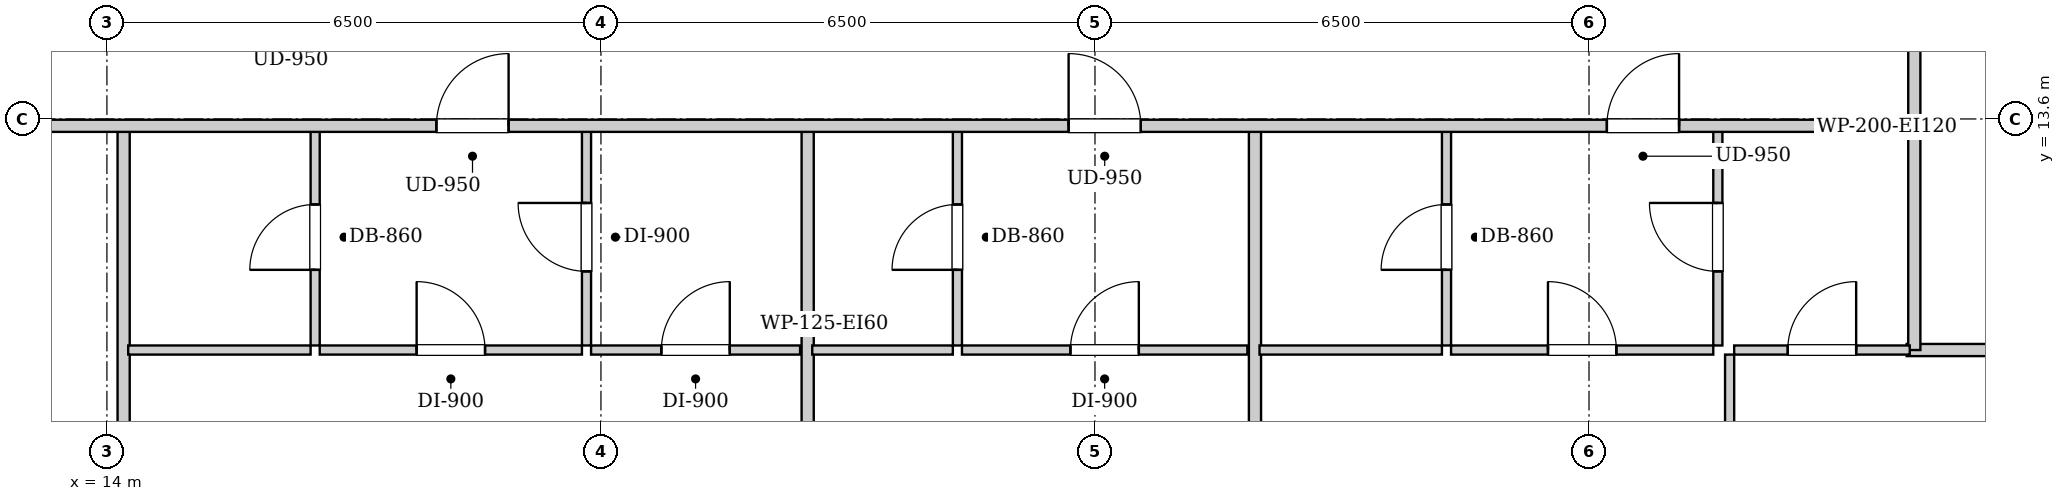
"""IFC4 building model, lengths in metres.
Left out: names, types, materials, properties, quantities, classifications, styles, units other than length and angle.
Written with IfcOpenShell. Run it as: python <this file> out.ifc"""

import sys

from ifc_helpers import new_model, si_unit, direction, frame, frame_2d, origin, place, context, subcontext, project, spatial, rectangle, extrude, element, fill, save


model = new_model("IFC4")
c1 = context("Model", 3, precision=1e-05, world=origin(), true_north=direction((0.0, 1.0)))
c2 = subcontext(c1, "Body", "Model", "MODEL_VIEW")
j1 = project(units=[si_unit("LENGTHUNIT", "METRE"), si_unit("PLANEANGLEUNIT", "RADIAN")], contexts=[c1])
p1 = place(None, origin())
s1 = spatial("IfcSite", under=j1, at=p1, CompositionType="ELEMENT")
p2 = place(p1, origin())
s2 = spatial("IfcBuilding", under=s1, at=p2, CompositionType="ELEMENT")
p3 = place(p2, frame((0.0, 0.0, 251.3)))
s3 = spatial("IfcBuildingStorey", under=s2, at=p3, CompositionType="ELEMENT", Elevation=251.3)
p4 = place(p3, frame((37.78, 13.51, 0.0), z_axis=(0.0, 0.0, 1.0), x_axis=(0.0, 1.0, 0.0)))
e1 = element("IfcWall", 1, at=p4, inside=s3, PredefinedType="PARTITIONING", context=c2, shape_type="SweptSolid", body=[
    extrude(rectangle(XDim=1.58, YDim=0.16, at=frame_2d((0.79, 0.0))), origin(), (0.0, 0.0, 1.0), 3.14),
])
p5 = place(p3, frame((14.22, 4.08, 0.0), z_axis=(0.0, 0.0, 1.0), x_axis=(0.0, 1.0, 0.0)))
e2 = element("IfcWall", 2, at=p5, inside=s3, PredefinedType="PARTITIONING", context=c2, shape_type="SweptSolid", body=[
    extrude(rectangle(XDim=9.39, YDim=0.16, at=frame_2d((4.695, 0.0))), origin(), (0.0, 0.0, 1.0), 3.14),
])
p6 = place(p3, frame((16.74, 10.62, 0.0), z_axis=(0.0, 0.0, 1.0), x_axis=(0.0, 1.0, 0.0)))
e3 = element("IfcWall", 3, at=p6, inside=s3, PredefinedType="PARTITIONING", context=c2, shape_type="SweptSolid", body=[
    extrude(rectangle(XDim=2.85, YDim=0.12, at=frame_2d((1.425, 0.0))), origin(), (0.0, 0.0, 1.0), 3.14),
])
p7 = place(p6, frame((0.995, 0.0, 0.0)))
e4 = element("IfcOpeningElement", 4, at=p7, cuts=e3, PredefinedType="OPENING", context=c2, shape_type="SweptSolid", body=[
    extrude(rectangle(XDim=0.86, YDim=2.05, at=frame_2d((0.43, 1.025))), frame((0.0, 0.07, 0.0), z_axis=(0.0, -1.0, 0.0), x_axis=(1.0, 0.0, 0.0)), (0.0, 0.0, 1.0), 0.14),
])
p8 = place(p3, frame((14.28, 10.56, 0.0), z_axis=(0.0, 0.0, 1.0), x_axis=(1.0, 0.0, 0.0)))
e5 = element("IfcWall", 5, at=p8, inside=s3, PredefinedType="PARTITIONING", context=c2, shape_type="SweptSolid", body=[
    extrude(rectangle(XDim=2.4, YDim=0.12, at=frame_2d((1.2, 0.0))), origin(), (0.0, 0.0, 1.0), 3.14),
])
p9 = place(p3, frame((20.31, 10.62, 0.0), z_axis=(0.0, 0.0, 1.0), x_axis=(0.0, 1.0, 0.0)))
e6 = element("IfcWall", 6, at=p9, inside=s3, PredefinedType="PARTITIONING", context=c2, shape_type="SweptSolid", body=[
    extrude(rectangle(XDim=2.85, YDim=0.12, at=frame_2d((1.425, 0.0))), origin(), (0.0, 0.0, 1.0), 3.14),
])
p10 = place(p9, frame((0.975, 0.0, 0.0)))
e7 = element("IfcOpeningElement", 7, at=p10, cuts=e6, PredefinedType="OPENING", context=c2, shape_type="SweptSolid", body=[
    extrude(rectangle(XDim=0.9, YDim=2.05, at=frame_2d((0.45, 1.025))), frame((0.0, 0.07, 0.0), z_axis=(0.0, -1.0, 0.0), x_axis=(1.0, 0.0, 0.0)), (0.0, 0.0, 1.0), 0.14),
])
p11 = place(p3, frame((16.8, 10.56, 0.0), z_axis=(0.0, 0.0, 1.0), x_axis=(1.0, 0.0, 0.0)))
e8 = element("IfcWall", 8, at=p11, inside=s3, PredefinedType="PARTITIONING", context=c2, shape_type="SweptSolid", body=[
    extrude(rectangle(XDim=3.45, YDim=0.12, at=frame_2d((1.725, 0.0))), origin(), (0.0, 0.0, 1.0), 3.14),
])
p12 = place(p11, frame((1.275, 0.0, 0.0)))
e9 = element("IfcOpeningElement", 9, at=p12, cuts=e8, PredefinedType="OPENING", context=c2, shape_type="SweptSolid", body=[
    extrude(rectangle(XDim=0.9, YDim=2.05, at=frame_2d((0.45, 1.025))), frame((0.0, 0.07, 0.0), z_axis=(0.0, -1.0, 0.0), x_axis=(1.0, 0.0, 0.0)), (0.0, 0.0, 1.0), 0.14),
])
p13 = place(p3, frame((20.37, 10.56, 0.0), z_axis=(0.0, 0.0, 1.0), x_axis=(1.0, 0.0, 0.0)))
e10 = element("IfcWall", 10, at=p13, inside=s3, PredefinedType="PARTITIONING", context=c2, shape_type="SweptSolid", body=[
    extrude(rectangle(XDim=2.75, YDim=0.12, at=frame_2d((1.375, 0.0))), origin(), (0.0, 0.0, 1.0), 3.14),
])
p14 = place(p13, frame((0.925, 0.0, 0.0)))
e11 = element("IfcOpeningElement", 11, at=p14, cuts=e10, PredefinedType="OPENING", context=c2, shape_type="SweptSolid", body=[
    extrude(rectangle(XDim=0.9, YDim=2.05, at=frame_2d((0.45, 1.025))), frame((0.0, 0.07, 0.0), z_axis=(0.0, -1.0, 0.0), x_axis=(1.0, 0.0, 0.0)), (0.0, 0.0, 1.0), 0.14),
])
p15 = place(p3, frame((23.22, 4.08, 0.0), z_axis=(0.0, 0.0, 1.0), x_axis=(0.0, 1.0, 0.0)))
e12 = element("IfcWall", 12, at=p15, inside=s3, PredefinedType="PARTITIONING", context=c2, shape_type="SweptSolid", body=[
    extrude(rectangle(XDim=9.39, YDim=0.16, at=frame_2d((4.695, 0.0))), origin(), (0.0, 0.0, 1.0), 3.14),
])
p16 = place(p3, frame((25.19, 10.62, 0.0), z_axis=(0.0, 0.0, 1.0), x_axis=(0.0, 1.0, 0.0)))
e13 = element("IfcWall", 13, at=p16, inside=s3, PredefinedType="PARTITIONING", context=c2, shape_type="SweptSolid", body=[
    extrude(rectangle(XDim=2.85, YDim=0.12, at=frame_2d((1.425, 0.0))), origin(), (0.0, 0.0, 1.0), 3.14),
])
p17 = place(p16, frame((0.995, 0.0, 0.0)))
e14 = element("IfcOpeningElement", 14, at=p17, cuts=e13, PredefinedType="OPENING", context=c2, shape_type="SweptSolid", body=[
    extrude(rectangle(XDim=0.86, YDim=2.05, at=frame_2d((0.43, 1.025))), frame((0.0, 0.07, 0.0), z_axis=(0.0, -1.0, 0.0), x_axis=(1.0, 0.0, 0.0)), (0.0, 0.0, 1.0), 0.14),
])
p18 = place(p3, frame((23.28, 10.56, 0.0), z_axis=(0.0, 0.0, 1.0), x_axis=(1.0, 0.0, 0.0)))
e15 = element("IfcWall", 15, at=p18, inside=s3, PredefinedType="PARTITIONING", context=c2, shape_type="SweptSolid", body=[
    extrude(rectangle(XDim=1.85, YDim=0.12, at=frame_2d((0.925, 0.0))), origin(), (0.0, 0.0, 1.0), 3.14),
])
p19 = place(p3, frame((25.25, 10.56, 0.0), z_axis=(0.0, 0.0, 1.0), x_axis=(1.0, 0.0, 0.0)))
e16 = element("IfcWall", 16, at=p19, inside=s3, PredefinedType="PARTITIONING", context=c2, shape_type="SweptSolid", body=[
    extrude(rectangle(XDim=3.755, YDim=0.12, at=frame_2d((1.877, 0.0))), origin(), (0.0, 0.0, 1.0), 3.14),
])
p20 = place(p19, frame((1.427, 0.0, 0.0)))
e17 = element("IfcOpeningElement", 17, at=p20, cuts=e16, PredefinedType="OPENING", context=c2, shape_type="SweptSolid", body=[
    extrude(rectangle(XDim=0.9, YDim=2.05, at=frame_2d((0.45, 1.025))), frame((0.0, 0.07, 0.0), z_axis=(0.0, -1.0, 0.0), x_axis=(1.0, 0.0, 0.0)), (0.0, 0.0, 1.0), 0.14),
])
p21 = place(p3, frame((37.68, 10.56, 0.0), z_axis=(0.0, 0.0, 1.0), x_axis=(1.0, 0.0, 0.0)))
e18 = element("IfcWall", 18, at=p21, inside=s3, PredefinedType="PARTITIONING", context=c2, shape_type="SweptSolid", body=[
    extrude(rectangle(XDim=2.34, YDim=0.16, at=frame_2d((1.17, 0.0))), origin(), (0.0, 0.0, 1.0), 3.14),
])
p22 = place(p3, frame((37.78, 10.56, 0.0), z_axis=(0.0, 0.0, 1.0), x_axis=(0.0, 1.0, 0.0)))
e19 = element("IfcWall", 19, at=p22, inside=s3, PredefinedType="PARTITIONING", context=c2, shape_type="SweptSolid", body=[
    extrude(rectangle(XDim=2.91, YDim=0.16, at=frame_2d((1.455, 0.0))), origin(), (0.0, 0.0, 1.0), 3.14),
])
p23 = place(p3, frame((29.105, 4.08, 0.0), z_axis=(0.0, 0.0, 1.0), x_axis=(0.0, 1.0, 0.0)))
e20 = element("IfcWall", 20, at=p23, inside=s3, PredefinedType="PARTITIONING", context=c2, shape_type="SweptSolid", body=[
    extrude(rectangle(XDim=9.39, YDim=0.16, at=frame_2d((4.695, 0.0))), origin(), (0.0, 0.0, 1.0), 3.14),
])
p24 = place(p3, frame((31.625, 10.62, 0.0), z_axis=(0.0, 0.0, 1.0), x_axis=(0.0, 1.0, 0.0)))
e21 = element("IfcWall", 21, at=p24, inside=s3, PredefinedType="PARTITIONING", context=c2, shape_type="SweptSolid", body=[
    extrude(rectangle(XDim=2.85, YDim=0.12, at=frame_2d((1.425, 0.0))), origin(), (0.0, 0.0, 1.0), 3.14),
])
p25 = place(p24, frame((0.995, 0.0, 0.0)))
e22 = element("IfcOpeningElement", 22, at=p25, cuts=e21, PredefinedType="OPENING", context=c2, shape_type="SweptSolid", body=[
    extrude(rectangle(XDim=0.86, YDim=2.05, at=frame_2d((0.43, 1.025))), frame((0.0, 0.07, 0.0), z_axis=(0.0, -1.0, 0.0), x_axis=(1.0, 0.0, 0.0)), (0.0, 0.0, 1.0), 0.14),
])
p26 = place(p3, frame((29.165, 10.56, 0.0), z_axis=(0.0, 0.0, 1.0), x_axis=(1.0, 0.0, 0.0)))
e23 = element("IfcWall", 23, at=p26, inside=s3, PredefinedType="PARTITIONING", context=c2, shape_type="SweptSolid", body=[
    extrude(rectangle(XDim=2.4, YDim=0.12, at=frame_2d((1.2, 0.0))), origin(), (0.0, 0.0, 1.0), 3.14),
])
p27 = place(p3, frame((35.195, 10.62, 0.0), z_axis=(0.0, 0.0, 1.0), x_axis=(0.0, 1.0, 0.0)))
e24 = element("IfcWall", 24, at=p27, inside=s3, PredefinedType="PARTITIONING", context=c2, shape_type="SweptSolid", body=[
    extrude(rectangle(XDim=2.85, YDim=0.12, at=frame_2d((1.425, 0.0))), origin(), (0.0, 0.0, 1.0), 3.14),
])
p28 = place(p27, frame((0.975, 0.0, 0.0)))
e25 = element("IfcOpeningElement", 25, at=p28, cuts=e24, PredefinedType="OPENING", context=c2, shape_type="SweptSolid", body=[
    extrude(rectangle(XDim=0.9, YDim=2.05, at=frame_2d((0.45, 1.025))), frame((0.0, 0.07, 0.0), z_axis=(0.0, -1.0, 0.0), x_axis=(1.0, 0.0, 0.0)), (0.0, 0.0, 1.0), 0.14),
])
p29 = place(p3, frame((31.685, 10.56, 0.0), z_axis=(0.0, 0.0, 1.0), x_axis=(1.0, 0.0, 0.0)))
e26 = element("IfcWall", 26, at=p29, inside=s3, PredefinedType="PARTITIONING", context=c2, shape_type="SweptSolid", body=[
    extrude(rectangle(XDim=3.45, YDim=0.12, at=frame_2d((1.725, 0.0))), origin(), (0.0, 0.0, 1.0), 3.14),
])
p30 = place(p29, frame((1.275, 0.0, 0.0)))
e27 = element("IfcOpeningElement", 27, at=p30, cuts=e26, PredefinedType="OPENING", context=c2, shape_type="SweptSolid", body=[
    extrude(rectangle(XDim=0.9, YDim=2.05, at=frame_2d((0.45, 1.025))), frame((0.0, 0.07, 0.0), z_axis=(0.0, -1.0, 0.0), x_axis=(1.0, 0.0, 0.0)), (0.0, 0.0, 1.0), 0.14),
])
p31 = place(p3, frame((35.41, 10.56, 0.0), z_axis=(0.0, 0.0, 1.0), x_axis=(1.0, 0.0, 0.0)))
e28 = element("IfcWall", 28, at=p31, inside=s3, PredefinedType="PARTITIONING", context=c2, shape_type="SweptSolid", body=[
    extrude(rectangle(XDim=2.31, YDim=0.12, at=frame_2d((1.155, 0.0))), origin(), (0.0, 0.0, 1.0), 3.14),
])
p32 = place(p31, frame((0.705, 0.0, 0.0)))
e29 = element("IfcOpeningElement", 29, at=p32, cuts=e28, PredefinedType="OPENING", context=c2, shape_type="SweptSolid", body=[
    extrude(rectangle(XDim=0.9, YDim=2.05, at=frame_2d((0.45, 1.025))), frame((0.0, 0.07, 0.0), z_axis=(0.0, -1.0, 0.0), x_axis=(1.0, 0.0, 0.0)), (0.0, 0.0, 1.0), 0.14),
])
p33 = place(p3, frame((35.35, 4.08, 0.0), z_axis=(0.0, 0.0, 1.0), x_axis=(0.0, 1.0, 0.0)))
e30 = element("IfcWall", 30, at=p33, inside=s3, PredefinedType="PARTITIONING", context=c2, shape_type="SweptSolid", body=[
    extrude(rectangle(XDim=6.42, YDim=0.12, at=frame_2d((3.21, 0.0))), origin(), (0.0, 0.0, 1.0), 3.14),
])
p34 = place(p33, frame((2.745, 0.0, 0.0)))
e31 = element("IfcOpeningElement", 31, at=p34, cuts=e30, PredefinedType="OPENING", context=c2, shape_type="SweptSolid", body=[
    extrude(rectangle(XDim=0.9, YDim=2.05, at=frame_2d((0.45, 1.025))), frame((0.0, 0.07, 0.0), z_axis=(0.0, -1.0, 0.0), x_axis=(1.0, 0.0, 0.0)), (0.0, 0.0, 1.0), 0.14),
])
p35 = place(p3, frame((13.15, 13.51, 0.0), z_axis=(0.0, 0.0, 1.0), x_axis=(1.0, 0.0, 0.0)))
e32 = element("IfcWall", 32, at=p35, inside=s3, PredefinedType="PARTITIONING", context=c2, shape_type="SweptSolid", body=[
    extrude(rectangle(XDim=24.6, YDim=0.16, at=frame_2d((12.3, 0.0))), origin(), (0.0, 0.0, 1.0), 3.14),
])
p36 = place(p35, frame((5.185, 0.0, 0.0)))
e33 = element("IfcOpeningElement", 33, at=p36, cuts=e32, PredefinedType="OPENING", context=c2, shape_type="SweptSolid", body=[
    extrude(rectangle(XDim=0.95, YDim=2.1, at=frame_2d((0.475, 1.05))), frame((0.0, 0.09, 0.0), z_axis=(0.0, -1.0, 0.0), x_axis=(1.0, 0.0, 0.0)), (0.0, 0.0, 1.0), 0.18),
])
p37 = place(p35, frame((13.503, 0.0, 0.0)))
e34 = element("IfcOpeningElement", 34, at=p37, cuts=e32, PredefinedType="OPENING", context=c2, shape_type="SweptSolid", body=[
    extrude(rectangle(XDim=0.95, YDim=2.1, at=frame_2d((0.475, 1.05))), frame((0.0, 0.09, 0.0), z_axis=(0.0, -1.0, 0.0), x_axis=(1.0, 0.0, 0.0)), (0.0, 0.0, 1.0), 0.18),
])
p38 = place(p35, frame((20.585, 0.0, 0.0)))
e35 = element("IfcOpeningElement", 35, at=p38, cuts=e32, PredefinedType="OPENING", context=c2, shape_type="SweptSolid", body=[
    extrude(rectangle(XDim=0.95, YDim=2.1, at=frame_2d((0.475, 1.05))), frame((0.0, 0.09, 0.0), z_axis=(0.0, -1.0, 0.0), x_axis=(1.0, 0.0, 0.0)), (0.0, 0.0, 1.0), 0.18),
])
p39 = place(p7, origin())
e36 = element("IfcDoor", 36, at=p39, inside=s3, OperationType="SINGLE_SWING_LEFT", PredefinedType="DOOR", context=c2, shape_type="SweptSolid", body=[
    extrude(rectangle(XDim=0.86, YDim=2.05, at=frame_2d((0.43, 1.025))), frame((0.0, 0.025, 0.0), z_axis=(0.0, -1.0, 0.0), x_axis=(1.0, 0.0, 0.0)), (0.0, 0.0, 1.0), 0.05),
])
fill(e4, e36)
p40 = place(p10, origin())
e37 = element("IfcDoor", 37, at=p40, inside=s3, OperationType="SINGLE_SWING_RIGHT", PredefinedType="DOOR", context=c2, shape_type="SweptSolid", body=[
    extrude(rectangle(XDim=0.9, YDim=2.05, at=frame_2d((0.45, 1.025))), frame((0.0, 0.025, 0.0), z_axis=(0.0, -1.0, 0.0), x_axis=(1.0, 0.0, 0.0)), (0.0, 0.0, 1.0), 0.05),
])
fill(e7, e37)
p41 = place(p12, origin())
e38 = element("IfcDoor", 38, at=p41, inside=s3, OperationType="SINGLE_SWING_LEFT", PredefinedType="DOOR", context=c2, shape_type="SweptSolid", body=[
    extrude(rectangle(XDim=0.9, YDim=2.05, at=frame_2d((0.45, 1.025))), frame((0.0, 0.025, 0.0), z_axis=(0.0, -1.0, 0.0), x_axis=(1.0, 0.0, 0.0)), (0.0, 0.0, 1.0), 0.05),
])
fill(e9, e38)
p42 = place(p14, origin())
e39 = element("IfcDoor", 39, at=p42, inside=s3, OperationType="SINGLE_SWING_RIGHT", PredefinedType="DOOR", context=c2, shape_type="SweptSolid", body=[
    extrude(rectangle(XDim=0.9, YDim=2.05, at=frame_2d((0.45, 1.025))), frame((0.0, 0.025, 0.0), z_axis=(0.0, -1.0, 0.0), x_axis=(1.0, 0.0, 0.0)), (0.0, 0.0, 1.0), 0.05),
])
fill(e11, e39)
p43 = place(p17, origin())
e40 = element("IfcDoor", 40, at=p43, inside=s3, OperationType="SINGLE_SWING_LEFT", PredefinedType="DOOR", context=c2, shape_type="SweptSolid", body=[
    extrude(rectangle(XDim=0.86, YDim=2.05, at=frame_2d((0.43, 1.025))), frame((0.0, 0.025, 0.0), z_axis=(0.0, -1.0, 0.0), x_axis=(1.0, 0.0, 0.0)), (0.0, 0.0, 1.0), 0.05),
])
fill(e14, e40)
p44 = place(p20, origin())
e41 = element("IfcDoor", 41, at=p44, inside=s3, OperationType="SINGLE_SWING_RIGHT", PredefinedType="DOOR", context=c2, shape_type="SweptSolid", body=[
    extrude(rectangle(XDim=0.9, YDim=2.05, at=frame_2d((0.45, 1.025))), frame((0.0, 0.025, 0.0), z_axis=(0.0, -1.0, 0.0), x_axis=(1.0, 0.0, 0.0)), (0.0, 0.0, 1.0), 0.05),
])
fill(e17, e41)
p45 = place(p25, origin())
e42 = element("IfcDoor", 42, at=p45, inside=s3, OperationType="SINGLE_SWING_LEFT", PredefinedType="DOOR", context=c2, shape_type="SweptSolid", body=[
    extrude(rectangle(XDim=0.86, YDim=2.05, at=frame_2d((0.43, 1.025))), frame((0.0, 0.025, 0.0), z_axis=(0.0, -1.0, 0.0), x_axis=(1.0, 0.0, 0.0)), (0.0, 0.0, 1.0), 0.05),
])
fill(e22, e42)
p46 = place(p28, origin())
e43 = element("IfcDoor", 43, at=p46, inside=s3, OperationType="SINGLE_SWING_RIGHT", PredefinedType="DOOR", context=c2, shape_type="SweptSolid", body=[
    extrude(rectangle(XDim=0.9, YDim=2.05, at=frame_2d((0.45, 1.025))), frame((0.0, 0.025, 0.0), z_axis=(0.0, -1.0, 0.0), x_axis=(1.0, 0.0, 0.0)), (0.0, 0.0, 1.0), 0.05),
])
fill(e25, e43)
p47 = place(p30, origin())
e44 = element("IfcDoor", 44, at=p47, inside=s3, OperationType="SINGLE_SWING_LEFT", PredefinedType="DOOR", context=c2, shape_type="SweptSolid", body=[
    extrude(rectangle(XDim=0.9, YDim=2.05, at=frame_2d((0.45, 1.025))), frame((0.0, 0.025, 0.0), z_axis=(0.0, -1.0, 0.0), x_axis=(1.0, 0.0, 0.0)), (0.0, 0.0, 1.0), 0.05),
])
fill(e27, e44)
p48 = place(p32, origin())
e45 = element("IfcDoor", 45, at=p48, inside=s3, OperationType="SINGLE_SWING_RIGHT", PredefinedType="DOOR", context=c2, shape_type="SweptSolid", body=[
    extrude(rectangle(XDim=0.9, YDim=2.05, at=frame_2d((0.45, 1.025))), frame((0.0, 0.025, 0.0), z_axis=(0.0, -1.0, 0.0), x_axis=(1.0, 0.0, 0.0)), (0.0, 0.0, 1.0), 0.05),
])
fill(e29, e45)
p49 = place(p36, origin())
e46 = element("IfcDoor", 46, at=p49, inside=s3, OperationType="SINGLE_SWING_RIGHT", PredefinedType="DOOR", context=c2, shape_type="SweptSolid", body=[
    extrude(rectangle(XDim=0.95, YDim=2.1, at=frame_2d((0.475, 1.05))), frame((0.0, 0.025, 0.0), z_axis=(0.0, -1.0, 0.0), x_axis=(1.0, 0.0, 0.0)), (0.0, 0.0, 1.0), 0.05),
])
fill(e33, e46)
p50 = place(p37, origin())
e47 = element("IfcDoor", 47, at=p50, inside=s3, OperationType="SINGLE_SWING_LEFT", PredefinedType="DOOR", context=c2, shape_type="SweptSolid", body=[
    extrude(rectangle(XDim=0.95, YDim=2.1, at=frame_2d((0.475, 1.05))), frame((0.0, 0.025, 0.0), z_axis=(0.0, -1.0, 0.0), x_axis=(1.0, 0.0, 0.0)), (0.0, 0.0, 1.0), 0.05),
])
fill(e34, e47)
p51 = place(p38, origin())
e48 = element("IfcDoor", 48, at=p51, inside=s3, OperationType="SINGLE_SWING_RIGHT", PredefinedType="DOOR", context=c2, shape_type="SweptSolid", body=[
    extrude(rectangle(XDim=0.95, YDim=2.1, at=frame_2d((0.475, 1.05))), frame((0.0, 0.025, 0.0), z_axis=(0.0, -1.0, 0.0), x_axis=(1.0, 0.0, 0.0)), (0.0, 0.0, 1.0), 0.05),
])
fill(e35, e48)
save(model, sys.argv[1])
